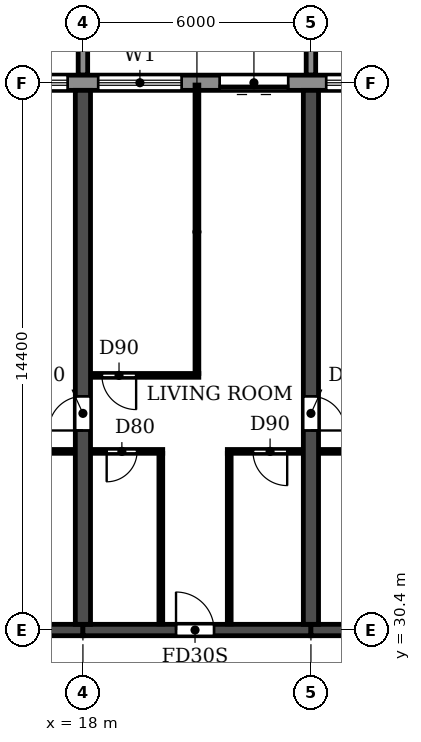
"""IFC4 building model, lengths in metres.
Left out: names, types, materials, properties, quantities, classifications, styles, units other than length and angle.
Written with IfcOpenShell. Run it as: python <this file> out.ifc"""

import sys

from ifc_helpers import new_model, si_unit, direction, frame, frame_2d, origin, place, context, subcontext, project, spatial, polyline, rectangle, outline, extrude, source, transform, mapped, element, fill, save


model = new_model("IFC4")
c1 = context("Model", 3, precision=1e-05, world=origin(), true_north=direction((0.0, 1.0)))
c2 = subcontext(c1, "Body", "Model", "MODEL_VIEW")
j1 = project(units=[si_unit("LENGTHUNIT", "METRE"), si_unit("PLANEANGLEUNIT", "RADIAN")], contexts=[c1])
p1 = place(None, origin())
s1 = spatial("IfcSite", under=j1, at=p1, CompositionType="ELEMENT")
p2 = place(p1, origin())
s2 = spatial("IfcBuilding", under=s1, at=p2, CompositionType="ELEMENT")
p3 = place(p2, frame((0.0, 0.0, 43.2)))
s3 = spatial("IfcBuildingStorey", under=s2, at=p3, CompositionType="ELEMENT", Elevation=43.2)
p4 = place(p3, frame((18.0, 30.55, 0.0), z_axis=(0.0, 0.0, 1.0), x_axis=(0.0, 1.0, 0.0)))
e1 = element("IfcWall", 1, at=p4, inside=s3, PredefinedType="SHEAR", context=c2, shape_type="SweptSolid", body=[
    extrude(rectangle(XDim=14.05, YDim=0.4, at=frame_2d((7.025, 0.0))), origin(), (0.0, 0.0, 1.0), 3.05),
])
p5 = place(p4, frame((5.1, 0.0, 0.0)))
e2 = element("IfcOpeningElement", 2, at=p5, cuts=e1, PredefinedType="OPENING", context=c2, shape_type="SweptSolid", body=[
    extrude(rectangle(XDim=0.9, YDim=2.1, at=frame_2d((0.45, 1.05))), frame((0.0, 0.21, 0.0), z_axis=(0.0, -1.0, 0.0), x_axis=(1.0, 0.0, 0.0)), (0.0, 0.0, 1.0), 0.42),
])
p6 = place(p3, frame((24.0, 30.55, 0.0), z_axis=(0.0, 0.0, 1.0), x_axis=(0.0, 1.0, 0.0)))
e3 = element("IfcWall", 3, at=p6, inside=s3, PredefinedType="SHEAR", context=c2, shape_type="SweptSolid", body=[
    extrude(rectangle(XDim=14.05, YDim=0.4, at=frame_2d((7.025, 0.0))), origin(), (0.0, 0.0, 1.0), 3.05),
])
p7 = place(p6, frame((5.1, 0.0, 0.0)))
e4 = element("IfcOpeningElement", 4, at=p7, cuts=e3, PredefinedType="OPENING", context=c2, shape_type="SweptSolid", body=[
    extrude(rectangle(XDim=0.9, YDim=2.1, at=frame_2d((0.45, 1.05))), frame((0.0, 0.21, 0.0), z_axis=(0.0, -1.0, 0.0), x_axis=(1.0, 0.0, 0.0)), (0.0, 0.0, 1.0), 0.42),
])
p8 = place(p3, frame((12.0, 30.4, 0.0), z_axis=(0.0, 0.0, 1.0), x_axis=(1.0, 0.0, 0.0)))
e5 = element("IfcWall", 5, at=p8, inside=s3, PredefinedType="SHEAR", context=c2, shape_type="SweptSolid", body=[
    extrude(rectangle(XDim=6.0, YDim=0.3, at=frame_2d((3.0, 0.0))), origin(), (0.0, 0.0, 1.0), 2.45),
])
p9 = place(p3, frame((18.0, 30.4, 0.0), z_axis=(0.0, 0.0, 1.0), x_axis=(1.0, 0.0, 0.0)))
e6 = element("IfcWall", 6, at=p9, inside=s3, PredefinedType="SHEAR", context=c2, shape_type="SweptSolid", body=[
    extrude(rectangle(XDim=6.0, YDim=0.3, at=frame_2d((3.0, 0.0))), origin(), (0.0, 0.0, 1.0), 2.45),
])
p10 = place(p9, frame((2.45, 0.0, 0.0)))
e7 = element("IfcOpeningElement", 7, at=p10, cuts=e6, PredefinedType="OPENING", context=c2, shape_type="SweptSolid", body=[
    extrude(rectangle(XDim=1.0, YDim=2.1, at=frame_2d((0.5, 1.05))), frame((0.0, 0.16, 0.0), z_axis=(0.0, -1.0, 0.0), x_axis=(1.0, 0.0, 0.0)), (0.0, 0.0, 1.0), 0.32),
])
p11 = place(p3, frame((24.0, 30.4, 0.0), z_axis=(0.0, 0.0, 1.0), x_axis=(1.0, 0.0, 0.0)))
e8 = element("IfcWall", 8, at=p11, inside=s3, PredefinedType="SHEAR", context=c2, shape_type="SweptSolid", body=[
    extrude(rectangle(XDim=6.0, YDim=0.3, at=frame_2d((3.0, 0.0))), origin(), (0.0, 0.0, 1.0), 2.45),
])
p12 = place(p3, frame((97.317, 44.8, 0.0), z_axis=(0.0, 0.0, 1.0), x_axis=(-1.0, 0.0, 0.0)))
e9 = element("IfcWall", 9, at=p12, inside=s3, PredefinedType="STANDARD", context=c2, shape_type="SweptSolid", body=[
    extrude(rectangle(XDim=92.634, YDim=0.4, at=frame_2d((46.317, 0.0))), origin(), (0.0, 0.0, 1.0), 3.05),
])
p13 = place(p12, frame((88.917, 0.0, 0.0)))
e10 = element("IfcOpeningElement", 10, at=p13, cuts=e9, PredefinedType="OPENING", context=c2, shape_type="SweptSolid", body=[
    extrude(rectangle(XDim=1.8, YDim=2.4, at=frame_2d((0.9, 1.2))), frame((0.0, 0.21, 0.0), z_axis=(0.0, -1.0, 0.0), x_axis=(1.0, 0.0, 0.0)), (0.0, 0.0, 1.0), 0.42),
])
p14 = place(p12, frame((85.717, 0.0, 0.9)))
e11 = element("IfcOpeningElement", 11, at=p14, cuts=e9, PredefinedType="OPENING", context=c2, shape_type="SweptSolid", body=[
    extrude(rectangle(XDim=2.2, YDim=1.5, at=frame_2d((1.1, 0.75))), frame((0.0, 0.21, 0.0), z_axis=(0.0, -1.0, 0.0), x_axis=(1.0, 0.0, 0.0)), (0.0, 0.0, 1.0), 0.42),
])
p15 = place(p12, frame((82.717, 0.0, 0.9)))
e12 = element("IfcOpeningElement", 12, at=p15, cuts=e9, PredefinedType="OPENING", context=c2, shape_type="SweptSolid", body=[
    extrude(rectangle(XDim=2.2, YDim=1.5, at=frame_2d((1.1, 0.75))), frame((0.0, 0.21, 0.0), z_axis=(0.0, -1.0, 0.0), x_axis=(1.0, 0.0, 0.0)), (0.0, 0.0, 1.0), 0.42),
])
p16 = place(p12, frame((79.717, 0.0, 0.9)))
e13 = element("IfcOpeningElement", 13, at=p16, cuts=e9, PredefinedType="OPENING", context=c2, shape_type="SweptSolid", body=[
    extrude(rectangle(XDim=2.2, YDim=1.5, at=frame_2d((1.1, 0.75))), frame((0.0, 0.21, 0.0), z_axis=(0.0, -1.0, 0.0), x_axis=(1.0, 0.0, 0.0)), (0.0, 0.0, 1.0), 0.42),
])
p17 = place(p12, frame((76.717, 0.0, 0.9)))
e14 = element("IfcOpeningElement", 14, at=p17, cuts=e9, PredefinedType="OPENING", context=c2, shape_type="SweptSolid", body=[
    extrude(rectangle(XDim=2.2, YDim=1.5, at=frame_2d((1.1, 0.75))), frame((0.0, 0.21, 0.0), z_axis=(0.0, -1.0, 0.0), x_axis=(1.0, 0.0, 0.0)), (0.0, 0.0, 1.0), 0.42),
])
p18 = place(p12, frame((73.917, 0.0, 0.0)))
e15 = element("IfcOpeningElement", 15, at=p18, cuts=e9, PredefinedType="OPENING", context=c2, shape_type="SweptSolid", body=[
    extrude(rectangle(XDim=1.8, YDim=2.4, at=frame_2d((0.9, 1.2))), frame((0.0, 0.21, 0.0), z_axis=(0.0, -1.0, 0.0), x_axis=(1.0, 0.0, 0.0)), (0.0, 0.0, 1.0), 0.42),
])
p19 = place(p12, frame((70.717, 0.0, 0.9)))
e16 = element("IfcOpeningElement", 16, at=p19, cuts=e9, PredefinedType="OPENING", context=c2, shape_type="SweptSolid", body=[
    extrude(rectangle(XDim=2.2, YDim=1.5, at=frame_2d((1.1, 0.75))), frame((0.0, 0.21, 0.0), z_axis=(0.0, -1.0, 0.0), x_axis=(1.0, 0.0, 0.0)), (0.0, 0.0, 1.0), 0.42),
])
p20 = place(p12, frame((67.717, 0.0, 0.9)))
e17 = element("IfcOpeningElement", 17, at=p20, cuts=e9, PredefinedType="OPENING", context=c2, shape_type="SweptSolid", body=[
    extrude(rectangle(XDim=2.2, YDim=1.5, at=frame_2d((1.1, 0.75))), frame((0.0, 0.21, 0.0), z_axis=(0.0, -1.0, 0.0), x_axis=(1.0, 0.0, 0.0)), (0.0, 0.0, 1.0), 0.42),
])
p21 = place(p12, frame((64.717, 0.0, 0.9)))
e18 = element("IfcOpeningElement", 18, at=p21, cuts=e9, PredefinedType="OPENING", context=c2, shape_type="SweptSolid", body=[
    extrude(rectangle(XDim=2.2, YDim=1.5, at=frame_2d((1.1, 0.75))), frame((0.0, 0.21, 0.0), z_axis=(0.0, -1.0, 0.0), x_axis=(1.0, 0.0, 0.0)), (0.0, 0.0, 1.0), 0.42),
])
p22 = place(p12, frame((61.917, 0.0, 0.0)))
e19 = element("IfcOpeningElement", 19, at=p22, cuts=e9, PredefinedType="OPENING", context=c2, shape_type="SweptSolid", body=[
    extrude(rectangle(XDim=1.8, YDim=2.4, at=frame_2d((0.9, 1.2))), frame((0.0, 0.21, 0.0), z_axis=(0.0, -1.0, 0.0), x_axis=(1.0, 0.0, 0.0)), (0.0, 0.0, 1.0), 0.42),
])
p23 = place(p12, frame((58.717, 0.0, 0.9)))
e20 = element("IfcOpeningElement", 20, at=p23, cuts=e9, PredefinedType="OPENING", context=c2, shape_type="SweptSolid", body=[
    extrude(rectangle(XDim=2.2, YDim=1.5, at=frame_2d((1.1, 0.75))), frame((0.0, 0.21, 0.0), z_axis=(0.0, -1.0, 0.0), x_axis=(1.0, 0.0, 0.0)), (0.0, 0.0, 1.0), 0.42),
])
p24 = place(p12, frame((55.717, 0.0, 0.9)))
e21 = element("IfcOpeningElement", 21, at=p24, cuts=e9, PredefinedType="OPENING", context=c2, shape_type="SweptSolid", body=[
    extrude(rectangle(XDim=2.2, YDim=1.5, at=frame_2d((1.1, 0.75))), frame((0.0, 0.21, 0.0), z_axis=(0.0, -1.0, 0.0), x_axis=(1.0, 0.0, 0.0)), (0.0, 0.0, 1.0), 0.42),
])
p25 = place(p12, frame((52.717, 0.0, 0.9)))
e22 = element("IfcOpeningElement", 22, at=p25, cuts=e9, PredefinedType="OPENING", context=c2, shape_type="SweptSolid", body=[
    extrude(rectangle(XDim=2.2, YDim=1.5, at=frame_2d((1.1, 0.75))), frame((0.0, 0.21, 0.0), z_axis=(0.0, -1.0, 0.0), x_axis=(1.0, 0.0, 0.0)), (0.0, 0.0, 1.0), 0.42),
])
p26 = place(p12, frame((49.917, 0.0, 0.0)))
e23 = element("IfcOpeningElement", 23, at=p26, cuts=e9, PredefinedType="OPENING", context=c2, shape_type="SweptSolid", body=[
    extrude(rectangle(XDim=1.8, YDim=2.4, at=frame_2d((0.9, 1.2))), frame((0.0, 0.21, 0.0), z_axis=(0.0, -1.0, 0.0), x_axis=(1.0, 0.0, 0.0)), (0.0, 0.0, 1.0), 0.42),
])
p27 = place(p12, frame((46.717, 0.0, 0.9)))
e24 = element("IfcOpeningElement", 24, at=p27, cuts=e9, PredefinedType="OPENING", context=c2, shape_type="SweptSolid", body=[
    extrude(rectangle(XDim=2.2, YDim=1.5, at=frame_2d((1.1, 0.75))), frame((0.0, 0.21, 0.0), z_axis=(0.0, -1.0, 0.0), x_axis=(1.0, 0.0, 0.0)), (0.0, 0.0, 1.0), 0.42),
])
p28 = place(p12, frame((43.717, 0.0, 0.9)))
e25 = element("IfcOpeningElement", 25, at=p28, cuts=e9, PredefinedType="OPENING", context=c2, shape_type="SweptSolid", body=[
    extrude(rectangle(XDim=2.2, YDim=1.5, at=frame_2d((1.1, 0.75))), frame((0.0, 0.21, 0.0), z_axis=(0.0, -1.0, 0.0), x_axis=(1.0, 0.0, 0.0)), (0.0, 0.0, 1.0), 0.42),
])
p29 = place(p12, frame((40.717, 0.0, 0.9)))
e26 = element("IfcOpeningElement", 26, at=p29, cuts=e9, PredefinedType="OPENING", context=c2, shape_type="SweptSolid", body=[
    extrude(rectangle(XDim=2.2, YDim=1.5, at=frame_2d((1.1, 0.75))), frame((0.0, 0.21, 0.0), z_axis=(0.0, -1.0, 0.0), x_axis=(1.0, 0.0, 0.0)), (0.0, 0.0, 1.0), 0.42),
])
p30 = place(p12, frame((37.917, 0.0, 0.0)))
e27 = element("IfcOpeningElement", 27, at=p30, cuts=e9, PredefinedType="OPENING", context=c2, shape_type="SweptSolid", body=[
    extrude(rectangle(XDim=1.8, YDim=2.4, at=frame_2d((0.9, 1.2))), frame((0.0, 0.21, 0.0), z_axis=(0.0, -1.0, 0.0), x_axis=(1.0, 0.0, 0.0)), (0.0, 0.0, 1.0), 0.42),
])
p31 = place(p12, frame((34.717, 0.0, 0.9)))
e28 = element("IfcOpeningElement", 28, at=p31, cuts=e9, PredefinedType="OPENING", context=c2, shape_type="SweptSolid", body=[
    extrude(rectangle(XDim=2.2, YDim=1.5, at=frame_2d((1.1, 0.75))), frame((0.0, 0.21, 0.0), z_axis=(0.0, -1.0, 0.0), x_axis=(1.0, 0.0, 0.0)), (0.0, 0.0, 1.0), 0.42),
])
p32 = place(p12, frame((31.717, 0.0, 0.9)))
e29 = element("IfcOpeningElement", 29, at=p32, cuts=e9, PredefinedType="OPENING", context=c2, shape_type="SweptSolid", body=[
    extrude(rectangle(XDim=2.2, YDim=1.5, at=frame_2d((1.1, 0.75))), frame((0.0, 0.21, 0.0), z_axis=(0.0, -1.0, 0.0), x_axis=(1.0, 0.0, 0.0)), (0.0, 0.0, 1.0), 0.42),
])
p33 = place(p12, frame((28.717, 0.0, 0.9)))
e30 = element("IfcOpeningElement", 30, at=p33, cuts=e9, PredefinedType="OPENING", context=c2, shape_type="SweptSolid", body=[
    extrude(rectangle(XDim=2.2, YDim=1.5, at=frame_2d((1.1, 0.75))), frame((0.0, 0.21, 0.0), z_axis=(0.0, -1.0, 0.0), x_axis=(1.0, 0.0, 0.0)), (0.0, 0.0, 1.0), 0.42),
])
p34 = place(p12, frame((25.917, 0.0, 0.0)))
e31 = element("IfcOpeningElement", 31, at=p34, cuts=e9, PredefinedType="OPENING", context=c2, shape_type="SweptSolid", body=[
    extrude(rectangle(XDim=1.8, YDim=2.4, at=frame_2d((0.9, 1.2))), frame((0.0, 0.21, 0.0), z_axis=(0.0, -1.0, 0.0), x_axis=(1.0, 0.0, 0.0)), (0.0, 0.0, 1.0), 0.42),
])
p35 = place(p12, frame((22.917, 0.0, 0.0)))
e32 = element("IfcOpeningElement", 32, at=p35, cuts=e9, PredefinedType="OPENING", context=c2, shape_type="SweptSolid", body=[
    extrude(rectangle(XDim=1.8, YDim=2.4, at=frame_2d((0.9, 1.2))), frame((0.0, 0.21, 0.0), z_axis=(0.0, -1.0, 0.0), x_axis=(1.0, 0.0, 0.0)), (0.0, 0.0, 1.0), 0.42),
])
p36 = place(p12, frame((19.717, 0.0, 0.9)))
e33 = element("IfcOpeningElement", 33, at=p36, cuts=e9, PredefinedType="OPENING", context=c2, shape_type="SweptSolid", body=[
    extrude(rectangle(XDim=2.2, YDim=1.5, at=frame_2d((1.1, 0.75))), frame((0.0, 0.21, 0.0), z_axis=(0.0, -1.0, 0.0), x_axis=(1.0, 0.0, 0.0)), (0.0, 0.0, 1.0), 0.42),
])
p37 = place(p12, frame((16.717, 0.0, 0.9)))
e34 = element("IfcOpeningElement", 34, at=p37, cuts=e9, PredefinedType="OPENING", context=c2, shape_type="SweptSolid", body=[
    extrude(rectangle(XDim=2.2, YDim=1.5, at=frame_2d((1.1, 0.75))), frame((0.0, 0.21, 0.0), z_axis=(0.0, -1.0, 0.0), x_axis=(1.0, 0.0, 0.0)), (0.0, 0.0, 1.0), 0.42),
])
p38 = place(p12, frame((13.717, 0.0, 0.9)))
e35 = element("IfcOpeningElement", 35, at=p38, cuts=e9, PredefinedType="OPENING", context=c2, shape_type="SweptSolid", body=[
    extrude(rectangle(XDim=2.2, YDim=1.5, at=frame_2d((1.1, 0.75))), frame((0.0, 0.21, 0.0), z_axis=(0.0, -1.0, 0.0), x_axis=(1.0, 0.0, 0.0)), (0.0, 0.0, 1.0), 0.42),
])
p39 = place(p12, frame((10.717, 0.0, 0.9)))
e36 = element("IfcOpeningElement", 36, at=p39, cuts=e9, PredefinedType="OPENING", context=c2, shape_type="SweptSolid", body=[
    extrude(rectangle(XDim=2.2, YDim=1.5, at=frame_2d((1.1, 0.75))), frame((0.0, 0.21, 0.0), z_axis=(0.0, -1.0, 0.0), x_axis=(1.0, 0.0, 0.0)), (0.0, 0.0, 1.0), 0.42),
])
p40 = place(p12, frame((7.917, 0.0, 0.0)))
e37 = element("IfcOpeningElement", 37, at=p40, cuts=e9, PredefinedType="OPENING", context=c2, shape_type="SweptSolid", body=[
    extrude(rectangle(XDim=1.8, YDim=2.4, at=frame_2d((0.9, 1.2))), frame((0.0, 0.21, 0.0), z_axis=(0.0, -1.0, 0.0), x_axis=(1.0, 0.0, 0.0)), (0.0, 0.0, 1.0), 0.42),
])
p41 = place(p12, frame((4.717, 0.0, 0.9)))
e38 = element("IfcOpeningElement", 38, at=p41, cuts=e9, PredefinedType="OPENING", context=c2, shape_type="SweptSolid", body=[
    extrude(rectangle(XDim=2.2, YDim=1.5, at=frame_2d((1.1, 0.75))), frame((0.0, 0.21, 0.0), z_axis=(0.0, -1.0, 0.0), x_axis=(1.0, 0.0, 0.0)), (0.0, 0.0, 1.0), 0.42),
])
p42 = place(p12, frame((1.917, 0.0, 0.0)))
e39 = element("IfcOpeningElement", 39, at=p42, cuts=e9, PredefinedType="OPENING", context=c2, shape_type="SweptSolid", body=[
    extrude(rectangle(XDim=1.8, YDim=2.4, at=frame_2d((0.9, 1.2))), frame((0.0, 0.21, 0.0), z_axis=(0.0, -1.0, 0.0), x_axis=(1.0, 0.0, 0.0)), (0.0, 0.0, 1.0), 0.42),
])
m1 = source(origin(), c2, "Body", "SweptSolid", [
    extrude(outline(polyline([(0.0, 0.0), (0.25, 0.0), (0.25, 3.1), (0.0, 3.1), (0.0, 0.0)])), origin(), (0.0, 0.0, 1.0), 3.1),
])
for number, where in (
    (40, (17.875, 45.0, 0.0)),
    (41, (23.875, 45.0, 0.0)),
):
    element("IfcWall", number, at=place(p3, frame(where)), inside=s3, PredefinedType="STANDARD", context=c2, shape_type="MappedRepresentation", body=[
        mapped(m1, transform((0.0, 0.0, 0.0))),
    ])
p43 = place(p3, frame((14.9, 35.1, 0.0), z_axis=(0.0, 0.0, 1.0), x_axis=(1.0, 0.0, 0.0)))
e42 = element("IfcWall", 42, at=p43, inside=s3, PredefinedType="PARTITIONING", context=c2, shape_type="SweptSolid", body=[
    extrude(rectangle(XDim=2.89, YDim=0.1, at=frame_2d((1.445, 0.0))), origin(), (0.0, 0.0, 1.0), 3.05),
])
p44 = place(p43, frame((1.2, 0.0, 0.0)))
e43 = element("IfcOpeningElement", 43, at=p44, cuts=e42, PredefinedType="OPENING", context=c2, shape_type="SweptSolid", body=[
    extrude(rectangle(XDim=0.8, YDim=2.1, at=frame_2d((0.4, 1.05))), frame((0.0, 0.06, 0.0), z_axis=(0.0, -1.0, 0.0), x_axis=(1.0, 0.0, 0.0)), (0.0, 0.0, 1.0), 0.12),
])
p45 = place(p3, frame((18.21, 35.1, 0.0), z_axis=(0.0, 0.0, 1.0), x_axis=(1.0, 0.0, 0.0)))
e44 = element("IfcWall", 44, at=p45, inside=s3, PredefinedType="PARTITIONING", context=c2, shape_type="SweptSolid", body=[
    extrude(rectangle(XDim=1.89, YDim=0.1, at=frame_2d((0.945, 0.0))), origin(), (0.0, 0.0, 1.0), 3.05),
])
p46 = place(p45, frame((0.415, 0.0, 0.0)))
e45 = element("IfcOpeningElement", 45, at=p46, cuts=e44, PredefinedType="OPENING", context=c2, shape_type="SweptSolid", body=[
    extrude(rectangle(XDim=0.8, YDim=2.1, at=frame_2d((0.4, 1.05))), frame((0.0, 0.06, 0.0), z_axis=(0.0, -1.0, 0.0), x_axis=(1.0, 0.0, 0.0)), (0.0, 0.0, 1.0), 0.12),
])
p47 = place(p3, frame((21.8, 35.1, 0.0), z_axis=(0.0, 0.0, 1.0), x_axis=(1.0, 0.0, 0.0)))
e46 = element("IfcWall", 46, at=p47, inside=s3, PredefinedType="PARTITIONING", context=c2, shape_type="SweptSolid", body=[
    extrude(rectangle(XDim=1.99, YDim=0.1, at=frame_2d((0.995, 0.0))), origin(), (0.0, 0.0, 1.0), 3.05),
])
p48 = place(p47, frame((0.675, 0.0, 0.0)))
e47 = element("IfcOpeningElement", 47, at=p48, cuts=e46, PredefinedType="OPENING", context=c2, shape_type="SweptSolid", body=[
    extrude(rectangle(XDim=0.9, YDim=2.1, at=frame_2d((0.45, 1.05))), frame((0.0, 0.06, 0.0), z_axis=(0.0, -1.0, 0.0), x_axis=(1.0, 0.0, 0.0)), (0.0, 0.0, 1.0), 0.12),
])
p49 = place(p3, frame((24.21, 35.1, 0.0), z_axis=(0.0, 0.0, 1.0), x_axis=(1.0, 0.0, 0.0)))
e48 = element("IfcWall", 48, at=p49, inside=s3, PredefinedType="PARTITIONING", context=c2, shape_type="SweptSolid", body=[
    extrude(rectangle(XDim=2.69, YDim=0.1, at=frame_2d((1.345, 0.0))), origin(), (0.0, 0.0, 1.0), 3.05),
])
p50 = place(p49, frame((0.89, 0.0, 0.0)))
e49 = element("IfcOpeningElement", 49, at=p50, cuts=e48, PredefinedType="OPENING", context=c2, shape_type="SweptSolid", body=[
    extrude(rectangle(XDim=0.8, YDim=2.1, at=frame_2d((0.4, 1.05))), frame((0.0, 0.06, 0.0), z_axis=(0.0, -1.0, 0.0), x_axis=(1.0, 0.0, 0.0)), (0.0, 0.0, 1.0), 0.12),
])
p51 = place(p3, frame((18.21, 37.1, 0.0), z_axis=(0.0, 0.0, 1.0), x_axis=(1.0, 0.0, 0.0)))
e50 = element("IfcWall", 50, at=p51, inside=s3, PredefinedType="PARTITIONING", context=c2, shape_type="SweptSolid", body=[
    extrude(rectangle(XDim=2.84, YDim=0.1, at=frame_2d((1.42, 0.0))), origin(), (0.0, 0.0, 1.0), 3.05),
])
p52 = place(p51, frame((0.29, 0.0, 0.0)))
e51 = element("IfcOpeningElement", 51, at=p52, cuts=e50, PredefinedType="OPENING", context=c2, shape_type="SweptSolid", body=[
    extrude(rectangle(XDim=0.9, YDim=2.1, at=frame_2d((0.45, 1.05))), frame((0.0, 0.06, 0.0), z_axis=(0.0, -1.0, 0.0), x_axis=(1.0, 0.0, 0.0)), (0.0, 0.0, 1.0), 0.12),
])
p53 = place(p3, frame((20.05, 30.56, 0.0), z_axis=(0.0, 0.0, 1.0), x_axis=(0.0, 1.0, 0.0)))
e52 = element("IfcWall", 52, at=p53, inside=s3, PredefinedType="PARTITIONING", context=c2, shape_type="SweptSolid", body=[
    extrude(rectangle(XDim=4.49, YDim=0.1, at=frame_2d((2.245, 0.0))), origin(), (0.0, 0.0, 1.0), 3.05),
])
p54 = place(p3, frame((21.0, 37.15, 0.0), z_axis=(0.0, 0.0, 1.0), x_axis=(0.0, 1.0, 0.0)))
e53 = element("IfcWall", 53, at=p54, inside=s3, PredefinedType="PARTITIONING", context=c2, shape_type="SweptSolid", body=[
    extrude(rectangle(XDim=7.59, YDim=0.1, at=frame_2d((3.795, 0.0))), origin(), (0.0, 0.0, 1.0), 3.05),
])
p55 = place(p3, frame((21.85, 30.56, 0.0), z_axis=(0.0, 0.0, 1.0), x_axis=(0.0, 1.0, 0.0)))
e54 = element("IfcWall", 54, at=p55, inside=s3, PredefinedType="PARTITIONING", context=c2, shape_type="SweptSolid", body=[
    extrude(rectangle(XDim=4.49, YDim=0.1, at=frame_2d((2.245, 0.0))), origin(), (0.0, 0.0, 1.0), 3.05),
])
p56 = place(p16, origin())
e55 = element("IfcWindow", 55, at=p56, inside=s3, PartitioningType="DOUBLE_PANEL_HORIZONTAL", PredefinedType="WINDOW", context=c2, shape_type="SweptSolid", body=[
    extrude(rectangle(XDim=2.2, YDim=1.5, at=frame_2d((1.1, 0.75))), frame((0.0, 0.03, 0.0), z_axis=(0.0, -1.0, 0.0), x_axis=(1.0, 0.0, 0.0)), (0.0, 0.0, 1.0), 0.06),
])
fill(e13, e55)
p57 = place(p17, origin())
e56 = element("IfcWindow", 56, at=p57, inside=s3, PartitioningType="DOUBLE_PANEL_HORIZONTAL", PredefinedType="WINDOW", context=c2, shape_type="SweptSolid", body=[
    extrude(rectangle(XDim=2.2, YDim=1.5, at=frame_2d((1.1, 0.75))), frame((0.0, 0.03, 0.0), z_axis=(0.0, -1.0, 0.0), x_axis=(1.0, 0.0, 0.0)), (0.0, 0.0, 1.0), 0.06),
])
fill(e14, e56)
p58 = place(p18, origin())
e57 = element("IfcDoor", 57, at=p58, inside=s3, OperationType="DOUBLE_DOOR_SLIDING", PredefinedType="DOOR", context=c2, shape_type="SweptSolid", body=[
    extrude(rectangle(XDim=1.8, YDim=2.4, at=frame_2d((0.9, 1.2))), frame((0.0, 0.025, 0.0), z_axis=(0.0, -1.0, 0.0), x_axis=(1.0, 0.0, 0.0)), (0.0, 0.0, 1.0), 0.05),
])
fill(e15, e57)
p59 = place(p19, origin())
e58 = element("IfcWindow", 58, at=p59, inside=s3, PartitioningType="DOUBLE_PANEL_HORIZONTAL", PredefinedType="WINDOW", context=c2, shape_type="SweptSolid", body=[
    extrude(rectangle(XDim=2.2, YDim=1.5, at=frame_2d((1.1, 0.75))), frame((0.0, 0.03, 0.0), z_axis=(0.0, -1.0, 0.0), x_axis=(1.0, 0.0, 0.0)), (0.0, 0.0, 1.0), 0.06),
])
fill(e16, e58)
p60 = place(p5, origin())
e59 = element("IfcDoor", 59, at=p60, inside=s3, OperationType="SINGLE_SWING_LEFT", PredefinedType="DOOR", context=c2, shape_type="SweptSolid", body=[
    extrude(rectangle(XDim=0.9, YDim=2.1, at=frame_2d((0.45, 1.05))), frame((0.0, 0.025, 0.0), z_axis=(0.0, -1.0, 0.0), x_axis=(1.0, 0.0, 0.0)), (0.0, 0.0, 1.0), 0.05),
])
fill(e2, e59)
p61 = place(p52, frame((0.9, 0.0, 0.0), z_axis=(0.0, 0.0, 1.0), x_axis=(-1.0, 0.0, 0.0)))
e60 = element("IfcDoor", 60, at=p61, inside=s3, OperationType="SINGLE_SWING_LEFT", PredefinedType="DOOR", context=c2, shape_type="SweptSolid", body=[
    extrude(rectangle(XDim=0.9, YDim=2.1, at=frame_2d((0.45, 1.05))), frame((0.0, 0.025, 0.0), z_axis=(0.0, -1.0, 0.0), x_axis=(1.0, 0.0, 0.0)), (0.0, 0.0, 1.0), 0.05),
])
fill(e51, e60)
p62 = place(p46, frame((0.8, 0.0, 0.0), z_axis=(0.0, 0.0, 1.0), x_axis=(-1.0, 0.0, 0.0)))
e61 = element("IfcDoor", 61, at=p62, inside=s3, OperationType="SINGLE_SWING_RIGHT", PredefinedType="DOOR", context=c2, shape_type="SweptSolid", body=[
    extrude(rectangle(XDim=0.8, YDim=2.1, at=frame_2d((0.4, 1.05))), frame((0.0, 0.025, 0.0), z_axis=(0.0, -1.0, 0.0), x_axis=(1.0, 0.0, 0.0)), (0.0, 0.0, 1.0), 0.05),
])
fill(e45, e61)
p63 = place(p10, origin())
e62 = element("IfcDoor", 62, at=p63, inside=s3, OperationType="SINGLE_SWING_LEFT", PredefinedType="DOOR", context=c2, shape_type="SweptSolid", body=[
    extrude(rectangle(XDim=1.0, YDim=2.1, at=frame_2d((0.5, 1.05))), frame((0.0, 0.025, 0.0), z_axis=(0.0, -1.0, 0.0), x_axis=(1.0, 0.0, 0.0)), (0.0, 0.0, 1.0), 0.05),
])
fill(e7, e62)
p64 = place(p48, frame((0.9, 0.0, 0.0), z_axis=(0.0, 0.0, 1.0), x_axis=(-1.0, 0.0, 0.0)))
e63 = element("IfcDoor", 63, at=p64, inside=s3, OperationType="SINGLE_SWING_LEFT", PredefinedType="DOOR", context=c2, shape_type="SweptSolid", body=[
    extrude(rectangle(XDim=0.9, YDim=2.1, at=frame_2d((0.45, 1.05))), frame((0.0, 0.025, 0.0), z_axis=(0.0, -1.0, 0.0), x_axis=(1.0, 0.0, 0.0)), (0.0, 0.0, 1.0), 0.05),
])
fill(e47, e63)
p65 = place(p7, frame((0.9, 0.0, 0.0), z_axis=(0.0, 0.0, 1.0), x_axis=(-1.0, 0.0, 0.0)))
e64 = element("IfcDoor", 64, at=p65, inside=s3, OperationType="SINGLE_SWING_RIGHT", PredefinedType="DOOR", context=c2, shape_type="SweptSolid", body=[
    extrude(rectangle(XDim=0.9, YDim=2.1, at=frame_2d((0.45, 1.05))), frame((0.0, 0.025, 0.0), z_axis=(0.0, -1.0, 0.0), x_axis=(1.0, 0.0, 0.0)), (0.0, 0.0, 1.0), 0.05),
])
fill(e4, e64)
save(model, sys.argv[1])
